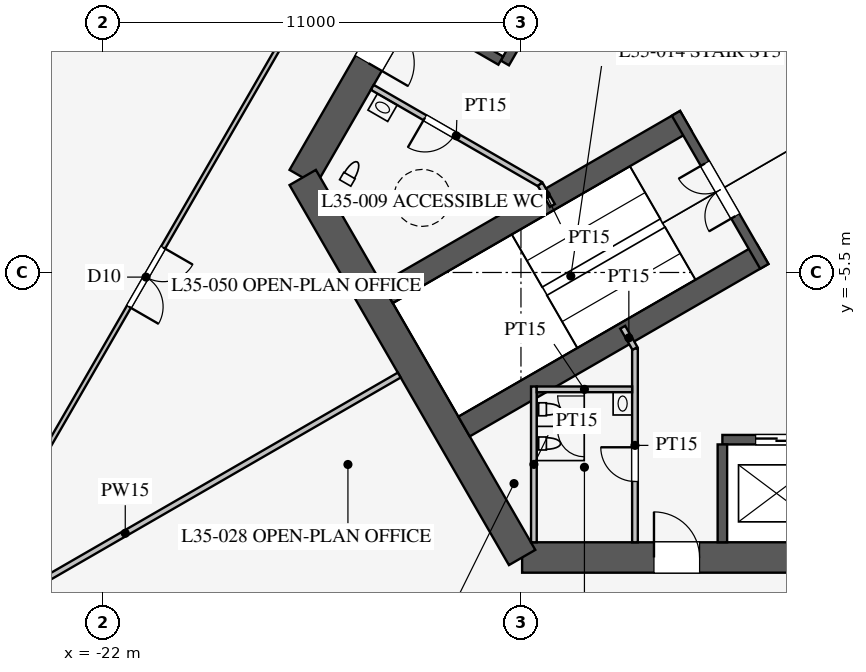
"""IFC4 building model, lengths in metres.
Left out: names, types, materials, properties, quantities, classifications, styles, units other than length and angle.
Written with IfcOpenShell. Run it as: python <this file> out.ifc"""

import sys

from ifc_helpers import new_model, si_unit, direction, frame, frame_2d, origin, place, context, subcontext, project, spatial, rectangle, extrude, element, fill, save


model = new_model("IFC4")
c1 = context("Model", 3, precision=1e-05, world=origin(), true_north=direction((0.0, 1.0)))
c2 = subcontext(c1, "Body", "Model", "MODEL_VIEW")
j1 = project(units=[si_unit("LENGTHUNIT", "METRE"), si_unit("PLANEANGLEUNIT", "RADIAN")], contexts=[c1])
p1 = place(None, origin())
s1 = spatial("IfcSite", under=j1, at=p1, CompositionType="ELEMENT")
p2 = place(p1, origin())
s2 = spatial("IfcBuilding", under=s1, at=p2, CompositionType="ELEMENT")
p3 = place(p2, frame((0.0, 0.0, 153.5)))
s3 = spatial("IfcBuildingStorey", under=s2, at=p3, CompositionType="ELEMENT", Elevation=153.5)
p4 = place(p3, frame((-10.97, -13.0, 0.0), z_axis=(0.0, 0.0, 1.0), x_axis=(1.0, 0.0, 0.0)))
e1 = element("IfcWall", 1, at=p4, inside=s3, PredefinedType="SHEAR", context=c2, shape_type="SweptSolid", body=[
    extrude(rectangle(XDim=21.939, YDim=0.8, at=frame_2d((10.97, 0.0))), origin(), (0.0, 0.0, 1.0), 4.2),
])
p5 = place(p4, frame((17.27, 0.0, 0.0)))
e2 = element("IfcOpeningElement", 2, at=p5, cuts=e1, PredefinedType="OPENING", context=c2, shape_type="SweptSolid", body=[
    extrude(rectangle(XDim=1.2, YDim=2.1, at=frame_2d((0.6, 1.05))), frame((0.0, 0.41, 0.0), z_axis=(0.0, -1.0, 0.0), x_axis=(1.0, 0.0, 0.0)), (0.0, 0.0, 1.0), 0.82),
])
p6 = place(p4, frame((3.47, 0.0, 0.0)))
e3 = element("IfcOpeningElement", 3, at=p6, cuts=e1, PredefinedType="OPENING", context=c2, shape_type="SweptSolid", body=[
    extrude(rectangle(XDim=1.2, YDim=2.1, at=frame_2d((0.6, 1.05))), frame((0.0, 0.41, 0.0), z_axis=(0.0, -1.0, 0.0), x_axis=(1.0, 0.0, 0.0)), (0.0, 0.0, 1.0), 0.82),
])
p7 = place(p3, frame((-5.773, 16.0, 0.0), z_axis=(0.0, 0.0, 1.0), x_axis=(-0.500002442456, -0.866023993627, 0.0)))
e4 = element("IfcWall", 4, at=p7, inside=s3, PredefinedType="SHEAR", context=c2, shape_type="SweptSolid", body=[
    extrude(rectangle(XDim=21.939, YDim=0.8, at=frame_2d((10.97, 0.0))), origin(), (0.0, 0.0, 1.0), 4.2),
])
p8 = place(p7, frame((17.27, 0.0, 0.0)))
e5 = element("IfcOpeningElement", 5, at=p8, cuts=e4, PredefinedType="OPENING", context=c2, shape_type="SweptSolid", body=[
    extrude(rectangle(XDim=1.2, YDim=2.1, at=frame_2d((0.6, 1.05))), frame((0.0, 0.41, 0.0), z_axis=(0.0, -1.0, 0.0), x_axis=(1.0, 0.0, 0.0)), (0.0, 0.0, 1.0), 0.82),
])
p9 = place(p7, frame((3.47, 0.0, 0.0)))
e6 = element("IfcOpeningElement", 6, at=p9, cuts=e4, PredefinedType="OPENING", context=c2, shape_type="SweptSolid", body=[
    extrude(rectangle(XDim=1.2, YDim=2.1, at=frame_2d((0.6, 1.05))), frame((0.0, 0.41, 0.0), z_axis=(0.0, -1.0, 0.0), x_axis=(1.0, 0.0, 0.0)), (0.0, 0.0, 1.0), 0.82),
])
p10 = place(p3, frame((-16.743, -3.0, 0.0), z_axis=(0.0, 0.0, 1.0), x_axis=(0.499995765644, -0.866027848477, 0.0)))
e7 = element("IfcWall", 7, at=p10, inside=s3, PredefinedType="SHEAR", context=c2, shape_type="SweptSolid", body=[
    extrude(rectangle(XDim=11.547, YDim=0.8, at=frame_2d((5.773, 0.0))), origin(), (0.0, 0.0, 1.0), 4.2),
])
p11 = place(p3, frame((-5.7, -9.9, 0.0), z_axis=(0.0, 0.0, 1.0), x_axis=(1.0, 0.0, 0.0)))
e8 = element("IfcWall", 8, at=p11, inside=s3, PredefinedType="SHEAR", context=c2, shape_type="SweptSolid", body=[
    extrude(rectangle(XDim=11.4, YDim=0.25, at=frame_2d((5.7, 0.0))), origin(), (0.0, 0.0, 1.0), 4.2),
])
p12 = place(p11, frame((0.875, 0.0, 0.0)))
e9 = element("IfcOpeningElement", 9, at=p12, cuts=e8, PredefinedType="OPENING", context=c2, shape_type="SweptSolid", body=[
    extrude(rectangle(XDim=1.1, YDim=2.2, at=frame_2d((0.55, 1.1))), frame((0.0, 0.135, 0.0), z_axis=(0.0, -1.0, 0.0), x_axis=(1.0, 0.0, 0.0)), (0.0, 0.0, 1.0), 0.27),
])
p13 = place(p11, frame((3.725, 0.0, 0.0)))
e10 = element("IfcOpeningElement", 10, at=p13, cuts=e8, PredefinedType="OPENING", context=c2, shape_type="SweptSolid", body=[
    extrude(rectangle(XDim=1.1, YDim=2.2, at=frame_2d((0.55, 1.1))), frame((0.0, 0.135, 0.0), z_axis=(0.0, -1.0, 0.0), x_axis=(1.0, 0.0, 0.0)), (0.0, 0.0, 1.0), 0.27),
])
p14 = place(p11, frame((6.575, 0.0, 0.0)))
e11 = element("IfcOpeningElement", 11, at=p14, cuts=e8, PredefinedType="OPENING", context=c2, shape_type="SweptSolid", body=[
    extrude(rectangle(XDim=1.1, YDim=2.2, at=frame_2d((0.55, 1.1))), frame((0.0, 0.135, 0.0), z_axis=(0.0, -1.0, 0.0), x_axis=(1.0, 0.0, 0.0)), (0.0, 0.0, 1.0), 0.27),
])
p15 = place(p11, frame((9.425, 0.0, 0.0)))
e12 = element("IfcOpeningElement", 12, at=p15, cuts=e8, PredefinedType="OPENING", context=c2, shape_type="SweptSolid", body=[
    extrude(rectangle(XDim=1.1, YDim=2.2, at=frame_2d((0.55, 1.1))), frame((0.0, 0.135, 0.0), z_axis=(0.0, -1.0, 0.0), x_axis=(1.0, 0.0, 0.0)), (0.0, 0.0, 1.0), 0.27),
])
p16 = place(p3, frame((-5.7, -10.025, 0.0), z_axis=(0.0, 0.0, 1.0), x_axis=(0.0, -1.0, 0.0)))
e13 = element("IfcWall", 13, at=p16, inside=s3, PredefinedType="SHEAR", context=c2, shape_type="SweptSolid", body=[
    extrude(rectangle(XDim=2.575, YDim=0.25, at=frame_2d((1.288, 0.0))), origin(), (0.0, 0.0, 1.0), 4.2),
])
p17 = place(p3, frame((-5.724, 9.886, 0.0), z_axis=(0.0, 0.0, 1.0), x_axis=(-0.500001763848, -0.866024385424, 0.0)))
e14 = element("IfcWall", 14, at=p17, inside=s3, PredefinedType="SHEAR", context=c2, shape_type="SweptSolid", body=[
    extrude(rectangle(XDim=11.4, YDim=0.25, at=frame_2d((5.7, 0.0))), origin(), (0.0, 0.0, 1.0), 4.2),
])
p18 = place(p17, frame((6.525, 0.0, 0.0)))
e15 = element("IfcOpeningElement", 15, at=p18, cuts=e14, PredefinedType="OPENING", context=c2, shape_type="SweptSolid", body=[
    extrude(rectangle(XDim=1.2, YDim=2.2, at=frame_2d((0.6, 1.1))), frame((0.0, 0.135, 0.0), z_axis=(0.0, -1.0, 0.0), x_axis=(1.0, 0.0, 0.0)), (0.0, 0.0, 1.0), 0.27),
])
p19 = place(p17, frame((9.375, 0.0, 0.0)))
e16 = element("IfcOpeningElement", 16, at=p19, cuts=e14, PredefinedType="OPENING", context=c2, shape_type="SweptSolid", body=[
    extrude(rectangle(XDim=1.2, YDim=2.2, at=frame_2d((0.6, 1.1))), frame((0.0, 0.135, 0.0), z_axis=(0.0, -1.0, 0.0), x_axis=(1.0, 0.0, 0.0)), (0.0, 0.0, 1.0), 0.27),
])
p20 = place(p3, frame((-11.532, 0.076, 0.0), z_axis=(0.0, 0.0, 1.0), x_axis=(-0.866005588531, 0.500034319456, 0.0)))
e17 = element("IfcWall", 17, at=p20, inside=s3, PredefinedType="SHEAR", context=c2, shape_type="SweptSolid", body=[
    extrude(rectangle(XDim=2.575, YDim=0.25, at=frame_2d((1.288, 0.0))), origin(), (0.0, 0.0, 1.0), 4.2),
])
for number, where, z_axis, x_axis in (
    (18, (-6.663, -1.509, 0.0), (0.0, 0.0, 1.0), (-0.866, -0.5, 0.0)),
    (19, (-4.638, -5.016, 0.0), (0.0, 0.0, 1.0), (-0.866, -0.5, 0.0)),
):
    element("IfcWall", number, at=place(p3, frame(where, z_axis=z_axis, x_axis=x_axis)), inside=s3, PredefinedType="SHEAR", context=c2, shape_type="SweptSolid", body=[
        extrude(rectangle(XDim=9.075, YDim=0.6, at=frame_2d((4.538, 0.0))), origin(), (0.0, 0.0, 1.0), 4.2),
    ])
p21 = place(p3, frame((-6.922, -1.312, 0.0), z_axis=(0.0, 0.0, 1.0), x_axis=(0.499984536904, -0.866034331223, 0.0)))
e20 = element("IfcWall", 20, at=p21, inside=s3, PredefinedType="SHEAR", context=c2, shape_type="SweptSolid", body=[
    extrude(rectangle(XDim=4.65, YDim=0.25, at=frame_2d((2.325, 0.0))), origin(), (0.0, 0.0, 1.0), 4.2),
])
p22 = place(p21, frame((1.525, 0.0, 0.0)))
e21 = element("IfcOpeningElement", 21, at=p22, cuts=e20, PredefinedType="OPENING", context=c2, shape_type="SweptSolid", body=[
    extrude(rectangle(XDim=1.6, YDim=2.1, at=frame_2d((0.8, 1.05))), frame((0.0, 0.135, 0.0), z_axis=(0.0, -1.0, 0.0), x_axis=(1.0, 0.0, 0.0)), (0.0, 0.0, 1.0), 0.27),
])
p23 = place(p3, frame((-8.0, -7.5, 0.0), z_axis=(0.0, 0.0, 1.0), x_axis=(0.0, -1.0, 0.0)))
e22 = element("IfcWall", 22, at=p23, inside=s3, PredefinedType="PARTITIONING", context=c2, shape_type="SweptSolid", body=[
    extrude(rectangle(XDim=5.1, YDim=0.15, at=frame_2d((2.55, 0.0))), origin(), (0.0, 0.0, 1.0), 4.0),
])
p24 = place(p23, frame((2.6, 0.0, 0.0)))
e23 = element("IfcOpeningElement", 23, at=p24, cuts=e22, PredefinedType="OPENING", context=c2, shape_type="SweptSolid", body=[
    extrude(rectangle(XDim=0.9, YDim=2.1, at=frame_2d((0.45, 1.05))), frame((0.0, 0.085, 0.0), z_axis=(0.0, -1.0, 0.0), x_axis=(1.0, 0.0, 0.0)), (0.0, 0.0, 1.0), 0.17),
])
p25 = place(p3, frame((-10.495, -3.178, 0.0), z_axis=(0.0, 0.0, 1.0), x_axis=(-0.86602216432, 0.500005610874, 0.0)))
e24 = element("IfcWall", 24, at=p25, inside=s3, PredefinedType="PARTITIONING", context=c2, shape_type="SweptSolid", body=[
    extrude(rectangle(XDim=5.1, YDim=0.15, at=frame_2d((2.55, 0.0))), origin(), (0.0, 0.0, 1.0), 4.0),
])
p26 = place(p25, frame((2.6, 0.0, 0.0)))
e25 = element("IfcOpeningElement", 25, at=p26, cuts=e24, PredefinedType="OPENING", context=c2, shape_type="SweptSolid", body=[
    extrude(rectangle(XDim=0.9, YDim=2.1, at=frame_2d((0.45, 1.05))), frame((0.0, 0.085, 0.0), z_axis=(0.0, -1.0, 0.0), x_axis=(1.0, 0.0, 0.0)), (0.0, 0.0, 1.0), 0.17),
])
for number, where, z_axis, x_axis in (
    (26, (-10.495, -3.178, 0.0), (0.0, 0.0, 1.0), (0.5, -0.866, 0.0)),
    (27, (-8.0, -7.5, 0.0), (0.0, 0.0, 1.0), (-0.5, 0.866, 0.0)),
):
    element("IfcWall", number, at=place(p3, frame(where, z_axis=z_axis, x_axis=x_axis)), inside=s3, PredefinedType="PARTITIONING", context=c2, shape_type="SweptSolid", body=[
        extrude(rectangle(XDim=0.645, YDim=0.15, at=frame_2d((0.323, 0.0))), origin(), (0.0, 0.0, 1.0), 4.0),
    ])
p27 = place(p3, frame((-10.66, -8.5, 0.0), z_axis=(0.0, 0.0, 1.0), x_axis=(0.0, -1.0, 0.0)))
e28 = element("IfcWall", 28, at=p27, inside=s3, PredefinedType="PARTITIONING", context=c2, shape_type="SweptSolid", body=[
    extrude(rectangle(XDim=4.1, YDim=0.15, at=frame_2d((2.05, 0.0))), origin(), (0.0, 0.0, 1.0), 4.0),
])
p28 = place(p3, frame((-8.075, -8.575, 0.0), z_axis=(0.0, 0.0, 1.0), x_axis=(-1.0, 0.0, 0.0)))
e29 = element("IfcWall", 29, at=p28, inside=s3, PredefinedType="PARTITIONING", context=c2, shape_type="SweptSolid", body=[
    extrude(rectangle(XDim=2.51, YDim=0.15, at=frame_2d((1.255, 0.0))), origin(), (0.0, 0.0, 1.0), 4.0),
])
p29 = place(p3, frame((-14.203, -8.2, 0.0), z_axis=(0.0, 0.0, 1.0), x_axis=(-0.866024668836, -0.500001272966, 0.0)))
e30 = element("IfcWall", 30, at=p29, inside=s3, PredefinedType="PARTITIONING", context=c2, shape_type="SweptSolid", body=[
    extrude(rectangle(XDim=16.65, YDim=0.15, at=frame_2d((8.325, 0.0))), origin(), (0.0, 0.0, 1.0), 2.3),
])
p30 = place(p3, frame((-0.016, 30.491, 0.0), z_axis=(0.0, 0.0, 1.0), x_axis=(-0.50000091641, -0.866024874695, 0.0)))
e31 = element("IfcWall", 31, at=p30, inside=s3, PredefinedType="PARTITIONING", context=c2, shape_type="SweptSolid", body=[
    extrude(rectangle(XDim=52.796, YDim=0.12, at=frame_2d((26.398, 0.0))), origin(), (0.0, 0.0, 1.0), 2.9),
])
p31 = place(p30, frame((10.2, 0.0, 0.15)))
e32 = element("IfcOpeningElement", 32, at=p31, cuts=e31, PredefinedType="OPENING", context=c2, shape_type="SweptSolid", body=[
    extrude(rectangle(XDim=1.8, YDim=2.1, at=frame_2d((0.9, 1.05))), frame((0.0, 0.07, 0.0), z_axis=(0.0, -1.0, 0.0), x_axis=(1.0, 0.0, 0.0)), (0.0, 0.0, 1.0), 0.14),
])
p32 = place(p30, frame((40.8, 0.0, 0.15)))
e33 = element("IfcOpeningElement", 33, at=p32, cuts=e31, PredefinedType="OPENING", context=c2, shape_type="SweptSolid", body=[
    extrude(rectangle(XDim=1.8, YDim=2.1, at=frame_2d((0.9, 1.05))), frame((0.0, 0.07, 0.0), z_axis=(0.0, -1.0, 0.0), x_axis=(1.0, 0.0, 0.0)), (0.0, 0.0, 1.0), 0.14),
])
p33 = place(p24, frame((0.9, 0.0, 0.0), z_axis=(0.0, 0.0, 1.0), x_axis=(-1.0, 0.0, 0.0)))
e34 = element("IfcDoor", 34, at=p33, inside=s3, OperationType="SINGLE_SWING_RIGHT", PredefinedType="DOOR", context=c2, shape_type="SweptSolid", body=[
    extrude(rectangle(XDim=0.9, YDim=2.1, at=frame_2d((0.45, 1.05))), frame((0.0, 0.025, 0.0), z_axis=(0.0, -1.0, 0.0), x_axis=(1.0, 0.0, 0.0)), (0.0, 0.0, 1.0), 0.05),
])
fill(e23, e34)
p34 = place(p26, origin())
e35 = element("IfcDoor", 35, at=p34, inside=s3, OperationType="SINGLE_SWING_RIGHT", PredefinedType="DOOR", context=c2, shape_type="SweptSolid", body=[
    extrude(rectangle(XDim=0.9, YDim=2.1, at=frame_2d((0.45, 1.05))), frame((0.0, 0.025, 0.0), z_axis=(0.0, -1.0, 0.0), x_axis=(1.0, 0.0, 0.0)), (0.0, 0.0, 1.0), 0.05),
])
fill(e25, e35)
p35 = place(p22, frame((1.6, 0.0, 0.0), z_axis=(0.0, 0.0, 1.0), x_axis=(-1.0, 0.0, 0.0)))
e36 = element("IfcDoor", 36, at=p35, inside=s3, OperationType="DOUBLE_DOOR_SINGLE_SWING", PredefinedType="DOOR", context=c2, shape_type="SweptSolid", body=[
    extrude(rectangle(XDim=1.6, YDim=2.1, at=frame_2d((0.8, 1.05))), frame((0.0, 0.025, 0.0), z_axis=(0.0, -1.0, 0.0), x_axis=(1.0, 0.0, 0.0)), (0.0, 0.0, 1.0), 0.05),
])
fill(e21, e36)
p36 = place(p6, origin())
e37 = element("IfcDoor", 37, at=p36, inside=s3, OperationType="SINGLE_SWING_LEFT", PredefinedType="DOOR", context=c2, shape_type="SweptSolid", body=[
    extrude(rectangle(XDim=1.2, YDim=2.1, at=frame_2d((0.6, 1.05))), frame((0.0, 0.025, 0.0), z_axis=(0.0, -1.0, 0.0), x_axis=(1.0, 0.0, 0.0)), (0.0, 0.0, 1.0), 0.05),
])
fill(e3, e37)
p37 = place(p8, origin())
e38 = element("IfcDoor", 38, at=p37, inside=s3, OperationType="SINGLE_SWING_RIGHT", PredefinedType="DOOR", context=c2, shape_type="SweptSolid", body=[
    extrude(rectangle(XDim=1.2, YDim=2.1, at=frame_2d((0.6, 1.05))), frame((0.0, 0.025, 0.0), z_axis=(0.0, -1.0, 0.0), x_axis=(1.0, 0.0, 0.0)), (0.0, 0.0, 1.0), 0.05),
])
fill(e5, e38)
p38 = place(p32, origin())
e39 = element("IfcDoor", 39, at=p38, inside=s3, OperationType="DOUBLE_DOOR_SINGLE_SWING", PredefinedType="DOOR", context=c2, shape_type="SweptSolid", body=[
    extrude(rectangle(XDim=1.8, YDim=2.1, at=frame_2d((0.9, 1.05))), frame((0.0, 0.025, 0.0), z_axis=(0.0, -1.0, 0.0), x_axis=(1.0, 0.0, 0.0)), (0.0, 0.0, 1.0), 0.05),
])
fill(e33, e39)
p39 = place(p12, origin())
e40 = element("IfcDoor", 40, at=p39, inside=s3, OperationType="DOUBLE_DOOR_SLIDING", PredefinedType="DOOR", context=c2, shape_type="SweptSolid", body=[
    extrude(rectangle(XDim=1.1, YDim=2.2, at=frame_2d((0.55, 1.1))), frame((0.0, 0.025, 0.0), z_axis=(0.0, -1.0, 0.0), x_axis=(1.0, 0.0, 0.0)), (0.0, 0.0, 1.0), 0.05),
])
fill(e9, e40)
save(model, sys.argv[1])
